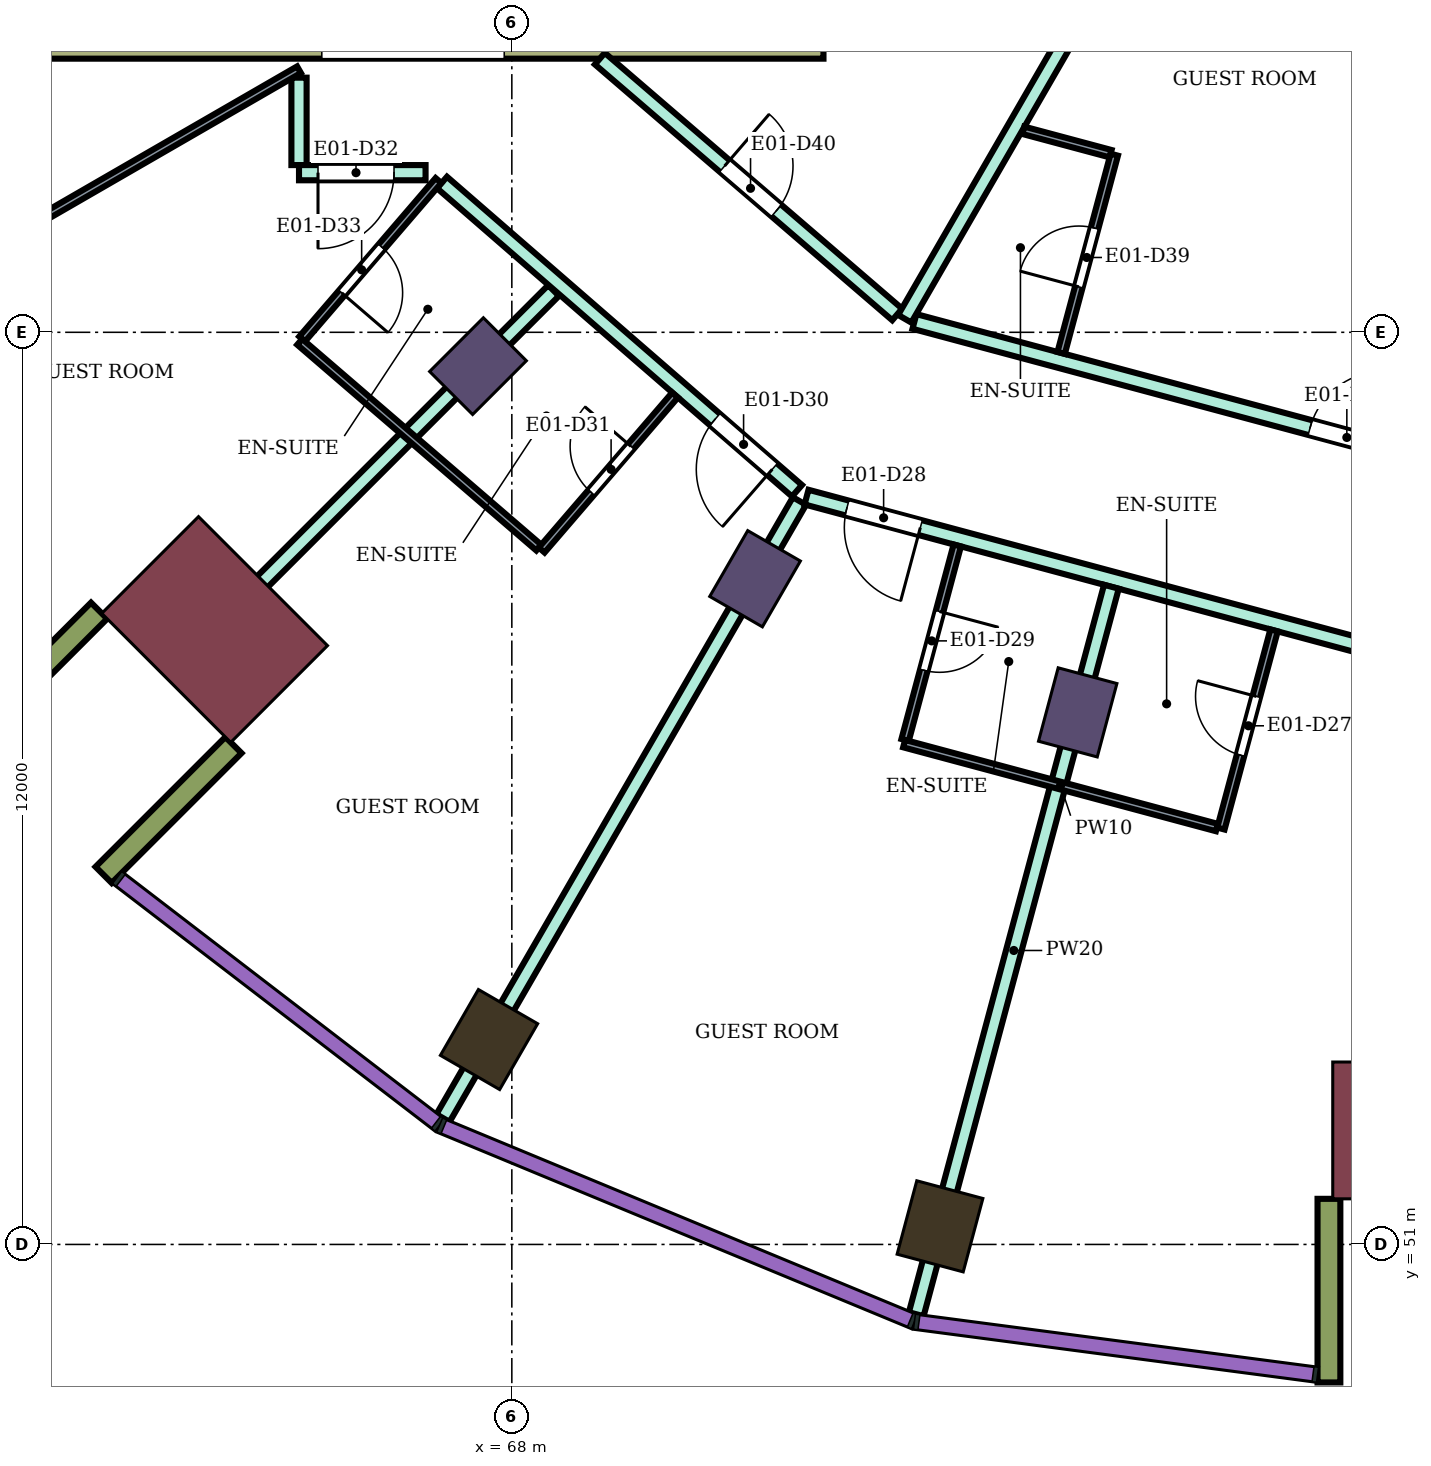
"""IFC4 building model, lengths in metres.
Left out: names, types, materials, properties, quantities, classifications, styles, units other than length and angle.
Written with IfcOpenShell. Run it as: python <this file> out.ifc"""

import sys

from ifc_helpers import new_model, si_unit, direction, frame, frame_2d, origin, origin_2d, place, context, subcontext, project, spatial, rectangle, extrude, element, fill, save


model = new_model("IFC4")
c1 = context("Model", 3, precision=1e-05, world=origin(), true_north=direction((0.0, 1.0)))
c2 = subcontext(c1, "Body", "Model", "MODEL_VIEW")
j1 = project(units=[si_unit("LENGTHUNIT", "METRE"), si_unit("PLANEANGLEUNIT", "RADIAN")], contexts=[c1])
p1 = place(None, origin())
s1 = spatial("IfcSite", under=j1, at=p1, CompositionType="ELEMENT")
p2 = place(p1, origin())
s2 = spatial("IfcBuilding", under=s1, at=p2, CompositionType="ELEMENT")
p3 = place(p2, frame((0.0, 0.0, 122.4)))
s3 = spatial("IfcBuildingStorey", under=s2, at=p3, CompositionType="ELEMENT", Elevation=122.4)
for number, where, z_axis, x_axis in (
    (1, (67.7, 53.696, 0.0), (0.0, 0.0, 1.0), (-0.5, -0.866, 0.0)),
    (2, (73.633, 51.238, 0.0), (0.0, 0.0, 1.0), (-0.259, -0.966, 0.0)),
):
    element("IfcColumn", number, at=place(p3, frame(where, z_axis=z_axis, x_axis=x_axis)), inside=s3, PredefinedType="COLUMN", context=c2, shape_type="SweptSolid", body=[
        extrude(rectangle(XDim=1.0, YDim=0.9, at=origin_2d()), origin(), (0.0, 0.0, 1.0), 3.9),
    ])
for number, where, z_axis, x_axis in (
    (3, (67.555, 62.555, 0.0), (0.0, 0.0, 1.0), (-0.707, -0.707, 0.0)),
    (4, (71.2, 59.758, 0.0), (0.0, 0.0, 1.0), (-0.5, -0.866, 0.0)),
    (5, (75.445, 58.0, 0.0), (0.0, 0.0, 1.0), (-0.259, -0.966, 0.0)),
):
    element("IfcColumn", number, at=place(p3, frame(where, z_axis=z_axis, x_axis=x_axis)), inside=s3, PredefinedType="COLUMN", context=c2, shape_type="SweptSolid", body=[
        extrude(rectangle(XDim=1.0, YDim=0.8, at=origin_2d()), origin(), (0.0, 0.0, 1.0), 3.9),
    ])
for number, where, z_axis, x_axis in (
    (6, (64.09, 59.09, 0.0), (0.0, 0.0, 1.0), (-0.707, -0.707, 0.0)),
    (7, (80.0, 52.5, 0.0), (0.0, 0.0, 1.0), (0.0, -1.0, 0.0)),
):
    element("IfcColumn", number, at=place(p3, frame(where, z_axis=z_axis, x_axis=x_axis)), inside=s3, PredefinedType="COLUMN", context=c2, shape_type="SweptSolid", body=[
        extrude(rectangle(XDim=1.8, YDim=2.4, at=origin_2d()), origin(), (0.0, 0.0, 1.0), 3.9),
    ])
p4 = place(p3, frame((72.1, 66.95, 0.0), z_axis=(0.0, 0.0, 1.0), x_axis=(-1.0, 0.0, 0.0)))
e8 = element("IfcWall", 8, at=p4, inside=s3, PredefinedType="SHEAR", context=c2, shape_type="SweptSolid", body=[
    extrude(rectangle(XDim=14.8, YDim=0.7, at=frame_2d((7.4, 0.0))), origin(), (0.0, 0.0, 1.0), 3.58),
])
p5 = place(p4, frame((4.2, 0.0, 0.0)))
e9 = element("IfcOpeningElement", 9, at=p5, cuts=e8, PredefinedType="OPENING", context=c2, shape_type="SweptSolid", body=[
    extrude(rectangle(XDim=2.4, YDim=2.4, at=frame_2d((1.2, 1.2))), frame((0.0, 0.36, 0.0), z_axis=(0.0, -1.0, 0.0), x_axis=(1.0, 0.0, 0.0)), (0.0, 0.0, 1.0), 0.72),
])
for number, where, z_axis, x_axis in (
    (10, (62.57, 59.338, 0.0), (0.0, 0.0, 1.0), (-0.707, -0.707, 0.0)),
    (11, (64.338, 57.57, 0.0), (0.0, 0.0, 1.0), (-0.707, -0.707, 0.0)),
    (12, (78.75, 51.6, 0.0), (0.0, 0.0, 1.0), (0.0, -1.0, 0.0)),
):
    element("IfcWall", number, at=place(p3, frame(where, z_axis=z_axis, x_axis=x_axis)), inside=s3, PredefinedType="NOTDEFINED", context=c2, shape_type="SweptSolid", body=[
        extrude(rectangle(XDim=2.416, YDim=0.3, at=frame_2d((1.208, 0.0))), origin(), (0.0, 0.0, 1.0), 3.9),
    ])
p6 = place(p3, frame((63.596, 58.596, 0.0), z_axis=(0.0, 0.0, 1.0), x_axis=(0.707106781187, 0.707106781187, 0.0)))
e13 = element("IfcWall", 13, at=p6, inside=s3, PredefinedType="PARTITIONING", context=c2, shape_type="SweptSolid", body=[
    extrude(rectangle(XDim=7.005, YDim=0.2, at=frame_2d((3.503, 0.0))), origin(), (0.0, 0.0, 1.0), 3.45),
])
p7 = place(p3, frame((65.2, 65.2, 0.0), z_axis=(0.0, 0.0, 1.0), x_axis=(0.0, 1.0, 0.0)))
e14 = element("IfcWall", 14, at=p7, inside=s3, PredefinedType="PARTITIONING", context=c2, shape_type="SweptSolid", body=[
    extrude(rectangle(XDim=1.15, YDim=0.2, at=frame_2d((0.575, 0.0))), origin(), (0.0, 0.0, 1.0), 3.45),
])
p8 = place(p3, frame((65.2, 65.1, 0.0), z_axis=(0.0, 0.0, 1.0), x_axis=(1.0, 0.0, 0.0)))
e15 = element("IfcWall", 15, at=p8, inside=s3, PredefinedType="PARTITIONING", context=c2, shape_type="SweptSolid", body=[
    extrude(rectangle(XDim=1.665, YDim=0.2, at=frame_2d((0.833, 0.0))), origin(), (0.0, 0.0, 1.0), 3.45),
])
p9 = place(p8, frame((0.25, 0.0, 0.0)))
e16 = element("IfcOpeningElement", 16, at=p9, cuts=e15, PredefinedType="OPENING", context=c2, shape_type="SweptSolid", body=[
    extrude(rectangle(XDim=1.0, YDim=2.1, at=frame_2d((0.5, 1.05))), frame((0.0, 0.11, 0.0), z_axis=(0.0, -1.0, 0.0), x_axis=(1.0, 0.0, 0.0)), (0.0, 0.0, 1.0), 0.22),
])
p10 = place(p3, frame((67.081, 64.971, 0.0), z_axis=(0.0, 0.0, 1.0), x_axis=(0.755031061605, -0.65568902386, 0.0)))
e17 = element("IfcWall", 17, at=p10, inside=s3, PredefinedType="PARTITIONING", context=c2, shape_type="SweptSolid", body=[
    extrude(rectangle(XDim=6.186, YDim=0.2, at=frame_2d((3.093, 0.0))), origin(), (0.0, 0.0, 1.0), 3.45),
])
p11 = place(p10, frame((4.755, 0.0, 0.0)))
e18 = element("IfcOpeningElement", 18, at=p11, cuts=e17, PredefinedType="OPENING", context=c2, shape_type="SweptSolid", body=[
    extrude(rectangle(XDim=1.0, YDim=2.1, at=frame_2d((0.5, 1.05))), frame((0.0, 0.11, 0.0), z_axis=(0.0, -1.0, 0.0), x_axis=(1.0, 0.0, 0.0)), (0.0, 0.0, 1.0), 0.22),
])
p12 = place(p3, frame((67.094, 52.663, 0.0), z_axis=(0.0, 0.0, 1.0), x_axis=(0.500228134253, 0.865893650342, 0.0)))
e19 = element("IfcWall", 19, at=p12, inside=s3, PredefinedType="PARTITIONING", context=c2, shape_type="SweptSolid", body=[
    extrude(rectangle(XDim=9.375, YDim=0.2, at=frame_2d((4.687, 0.0))), origin(), (0.0, 0.0, 1.0), 3.45),
])
p13 = place(p3, frame((69.158, 66.6, 0.0), z_axis=(0.0, 0.0, 1.0), x_axis=(0.758063092745, -0.652181222835, 0.0)))
e20 = element("IfcWall", 20, at=p13, inside=s3, PredefinedType="PARTITIONING", context=c2, shape_type="SweptSolid", body=[
    extrude(rectangle(XDim=5.16, YDim=0.2, at=frame_2d((2.58, 0.0))), origin(), (0.0, 0.0, 1.0), 3.45),
])
p14 = place(p13, frame((2.165, 0.0, 0.0)))
e21 = element("IfcOpeningElement", 21, at=p14, cuts=e20, PredefinedType="OPENING", context=c2, shape_type="SweptSolid", body=[
    extrude(rectangle(XDim=0.9, YDim=2.1, at=frame_2d((0.45, 1.05))), frame((0.0, 0.11, 0.0), z_axis=(0.0, -1.0, 0.0), x_axis=(1.0, 0.0, 0.0)), (0.0, 0.0, 1.0), 0.22),
])
p15 = place(p3, frame((71.877, 60.832, 0.0), z_axis=(0.0, 0.0, 1.0), x_axis=(0.965857276008, -0.259074742848, 0.0)))
e22 = element("IfcWall", 22, at=p15, inside=s3, PredefinedType="PARTITIONING", context=c2, shape_type="SweptSolid", body=[
    extrude(rectangle(XDim=8.36, YDim=0.2, at=frame_2d((4.18, 0.0))), origin(), (0.0, 0.0, 1.0), 3.45),
])
p16 = place(p15, frame((0.55, 0.0, 0.0)))
e23 = element("IfcOpeningElement", 23, at=p16, cuts=e22, PredefinedType="OPENING", context=c2, shape_type="SweptSolid", body=[
    extrude(rectangle(XDim=1.0, YDim=2.1, at=frame_2d((0.5, 1.05))), frame((0.0, 0.11, 0.0), z_axis=(0.0, -1.0, 0.0), x_axis=(1.0, 0.0, 0.0)), (0.0, 0.0, 1.0), 0.22),
])
p17 = place(p3, frame((73.297, 63.143, 0.0), z_axis=(0.0, 0.0, 1.0), x_axis=(0.965859030528, -0.25906820173, 0.0)))
e24 = element("IfcWall", 24, at=p17, inside=s3, PredefinedType="PARTITIONING", context=c2, shape_type="SweptSolid", body=[
    extrude(rectangle(XDim=6.81, YDim=0.2, at=frame_2d((3.405, 0.0))), origin(), (0.0, 0.0, 1.0), 3.45),
])
p18 = place(p17, frame((5.39, 0.0, 0.0)))
e25 = element("IfcOpeningElement", 25, at=p18, cuts=e24, PredefinedType="OPENING", context=c2, shape_type="SweptSolid", body=[
    extrude(rectangle(XDim=1.0, YDim=2.1, at=frame_2d((0.5, 1.05))), frame((0.0, 0.11, 0.0), z_axis=(0.0, -1.0, 0.0), x_axis=(1.0, 0.0, 0.0)), (0.0, 0.0, 1.0), 0.22),
])
p19 = place(p3, frame((73.169, 63.178, 0.0), z_axis=(0.0, 0.0, 1.0), x_axis=(0.500239348149, 0.865887171959, 0.0)))
e26 = element("IfcWall", 26, at=p19, inside=s3, PredefinedType="PARTITIONING", context=c2, shape_type="SweptSolid", body=[
    extrude(rectangle(XDim=5.955, YDim=0.2, at=frame_2d((2.978, 0.0))), origin(), (0.0, 0.0, 1.0), 3.45),
])
p20 = place(p3, frame((73.321, 50.082, 0.0), z_axis=(0.0, 0.0, 1.0), x_axis=(0.259057928998, 0.96586178588, 0.0)))
e27 = element("IfcWall", 27, at=p20, inside=s3, PredefinedType="PARTITIONING", context=c2, shape_type="SweptSolid", body=[
    extrude(rectangle(XDim=9.909, YDim=0.2, at=frame_2d((4.954, 0.0))), origin(), (0.0, 0.0, 1.0), 3.45),
])
p21 = place(p3, frame((57.659, 62.101, 0.0), z_axis=(0.0, 0.0, 1.0), x_axis=(0.86602264145, 0.500004784474, 0.0)))
e28 = element("IfcWall", 28, at=p21, inside=s3, PredefinedType="PARTITIONING", context=c2, shape_type="SweptSolid", body=[
    extrude(rectangle(XDim=8.708, YDim=0.1, at=frame_2d((4.354, 0.0))), origin(), (0.0, 0.0, 1.0), 3.45),
])
p22 = place(p21, frame((3.929, 0.0, 0.0)))
e29 = element("IfcOpeningElement", 29, at=p22, cuts=e28, PredefinedType="OPENING", context=c2, shape_type="SweptSolid", body=[
    extrude(rectangle(XDim=0.9, YDim=2.1, at=frame_2d((0.45, 1.05))), frame((0.0, 0.06, 0.0), z_axis=(0.0, -1.0, 0.0), x_axis=(1.0, 0.0, 0.0)), (0.0, 0.0, 1.0), 0.12),
])
p23 = place(p3, frame((65.242, 62.912, 0.0), z_axis=(0.0, 0.0, 1.0), x_axis=(0.652069888227, 0.758158862553, 0.0)))
e30 = element("IfcWall", 30, at=p23, inside=s3, PredefinedType="PARTITIONING", context=c2, shape_type="SweptSolid", body=[
    extrude(rectangle(XDim=2.75, YDim=0.1, at=frame_2d((1.375, 0.0))), origin(), (0.0, 0.0, 1.0), 3.45),
])
p24 = place(p23, frame((0.8, 0.0, 0.0)))
e31 = element("IfcOpeningElement", 31, at=p24, cuts=e30, PredefinedType="OPENING", context=c2, shape_type="SweptSolid", body=[
    extrude(rectangle(XDim=0.8, YDim=2.1, at=frame_2d((0.4, 1.05))), frame((0.0, 0.06, 0.0), z_axis=(0.0, -1.0, 0.0), x_axis=(1.0, 0.0, 0.0)), (0.0, 0.0, 1.0), 0.12),
])
p25 = place(p3, frame((65.209, 62.875, 0.0), z_axis=(0.0, 0.0, 1.0), x_axis=(0.757930378138, -0.652335451969, 0.0)))
e32 = element("IfcWall", 32, at=p25, inside=s3, PredefinedType="PARTITIONING", context=c2, shape_type="SweptSolid", body=[
    extrude(rectangle(XDim=4.15, YDim=0.1, at=frame_2d((2.075, 0.0))), origin(), (0.0, 0.0, 1.0), 3.45),
])
p26 = place(p3, frame((68.393, 60.135, 0.0), z_axis=(0.0, 0.0, 1.0), x_axis=(0.652061182569, 0.758166349944, 0.0)))
e33 = element("IfcWall", 33, at=p26, inside=s3, PredefinedType="PARTITIONING", context=c2, shape_type="SweptSolid", body=[
    extrude(rectangle(XDim=2.69, YDim=0.1, at=frame_2d((1.345, 0.0))), origin(), (0.0, 0.0, 1.0), 3.45),
])
p27 = place(p26, frame((1.0, 0.0, 0.0)))
e34 = element("IfcOpeningElement", 34, at=p27, cuts=e33, PredefinedType="OPENING", context=c2, shape_type="SweptSolid", body=[
    extrude(rectangle(XDim=0.8, YDim=2.1, at=frame_2d((0.4, 1.05))), frame((0.0, 0.06, 0.0), z_axis=(0.0, -1.0, 0.0), x_axis=(1.0, 0.0, 0.0)), (0.0, 0.0, 1.0), 0.12),
])
p28 = place(p3, frame((73.174, 57.636, 0.0), z_axis=(0.0, 0.0, 1.0), x_axis=(0.258952498977, 0.96589005755, 0.0)))
e35 = element("IfcWall", 35, at=p28, inside=s3, PredefinedType="PARTITIONING", context=c2, shape_type="SweptSolid", body=[
    extrude(rectangle(XDim=2.65, YDim=0.1, at=frame_2d((1.325, 0.0))), origin(), (0.0, 0.0, 1.0), 3.45),
])
p29 = place(p28, frame((0.95, 0.0, 0.0)))
e36 = element("IfcOpeningElement", 36, at=p29, cuts=e35, PredefinedType="OPENING", context=c2, shape_type="SweptSolid", body=[
    extrude(rectangle(XDim=0.8, YDim=2.1, at=frame_2d((0.4, 1.05))), frame((0.0, 0.06, 0.0), z_axis=(0.0, -1.0, 0.0), x_axis=(1.0, 0.0, 0.0)), (0.0, 0.0, 1.0), 0.12),
])
p30 = place(p3, frame((73.161, 57.588, 0.0), z_axis=(0.0, 0.0, 1.0), x_axis=(0.965858226827, -0.259071198071, 0.0)))
e37 = element("IfcWall", 37, at=p30, inside=s3, PredefinedType="PARTITIONING", context=c2, shape_type="SweptSolid", body=[
    extrude(rectangle(XDim=4.26, YDim=0.1, at=frame_2d((2.13, 0.0))), origin(), (0.0, 0.0, 1.0), 3.45),
])
p31 = place(p3, frame((74.729, 65.657, 0.0), z_axis=(0.0, 0.0, 1.0), x_axis=(0.965948051503, -0.258736085224, 0.0)))
e38 = element("IfcWall", 38, at=p31, inside=s3, PredefinedType="PARTITIONING", context=c2, shape_type="SweptSolid", body=[
    extrude(rectangle(XDim=1.189, YDim=0.1, at=frame_2d((0.594, 0.0))), origin(), (0.0, 0.0, 1.0), 3.45),
])
p32 = place(p3, frame((75.227, 62.729, 0.0), z_axis=(0.0, 0.0, 1.0), x_axis=(0.258945475746, 0.965891940432, 0.0)))
e39 = element("IfcWall", 39, at=p32, inside=s3, PredefinedType="PARTITIONING", context=c2, shape_type="SweptSolid", body=[
    extrude(rectangle(XDim=2.7, YDim=0.1, at=frame_2d((1.35, 0.0))), origin(), (0.0, 0.0, 1.0), 3.45),
])
p33 = place(p32, frame((0.9, 0.0, 0.0)))
e40 = element("IfcOpeningElement", 40, at=p33, cuts=e39, PredefinedType="OPENING", context=c2, shape_type="SweptSolid", body=[
    extrude(rectangle(XDim=0.8, YDim=2.1, at=frame_2d((0.4, 1.05))), frame((0.0, 0.06, 0.0), z_axis=(0.0, -1.0, 0.0), x_axis=(1.0, 0.0, 0.0)), (0.0, 0.0, 1.0), 0.12),
])
p34 = place(p3, frame((77.329, 56.471, 0.0), z_axis=(0.0, 0.0, 1.0), x_axis=(0.259013334072, 0.965873745773, 0.0)))
e41 = element("IfcWall", 41, at=p34, inside=s3, PredefinedType="PARTITIONING", context=c2, shape_type="SweptSolid", body=[
    extrude(rectangle(XDim=2.699, YDim=0.1, at=frame_2d((1.35, 0.0))), origin(), (0.0, 0.0, 1.0), 3.45),
])
p35 = place(p34, frame((1.0, 0.0, 0.0)))
e42 = element("IfcOpeningElement", 42, at=p35, cuts=e41, PredefinedType="OPENING", context=c2, shape_type="SweptSolid", body=[
    extrude(rectangle(XDim=0.8, YDim=2.1, at=frame_2d((0.4, 1.05))), frame((0.0, 0.06, 0.0), z_axis=(0.0, -1.0, 0.0), x_axis=(1.0, 0.0, 0.0)), (0.0, 0.0, 1.0), 0.12),
])
p36 = place(p35, origin())
e43 = element("IfcDoor", 43, at=p36, inside=s3, OperationType="SINGLE_SWING_RIGHT", PredefinedType="DOOR", context=c2, shape_type="SweptSolid", body=[
    extrude(rectangle(XDim=0.8, YDim=2.1, at=frame_2d((0.4, 1.05))), frame((0.0, 0.025, 0.0), z_axis=(0.0, -1.0, 0.0), x_axis=(1.0, 0.0, 0.0)), (0.0, 0.0, 1.0), 0.05),
])
fill(e42, e43)
p37 = place(p16, frame((1.0, 0.0, 0.0), z_axis=(0.0, 0.0, 1.0), x_axis=(-1.0, 0.0, 0.0)))
e44 = element("IfcDoor", 44, at=p37, inside=s3, OperationType="SINGLE_SWING_LEFT", PredefinedType="DOOR", context=c2, shape_type="SweptSolid", body=[
    extrude(rectangle(XDim=1.0, YDim=2.1, at=frame_2d((0.5, 1.05))), frame((0.0, 0.025, 0.0), z_axis=(0.0, -1.0, 0.0), x_axis=(1.0, 0.0, 0.0)), (0.0, 0.0, 1.0), 0.05),
])
fill(e23, e44)
p38 = place(p29, frame((0.8, 0.0, 0.0), z_axis=(0.0, 0.0, 1.0), x_axis=(-1.0, 0.0, 0.0)))
e45 = element("IfcDoor", 45, at=p38, inside=s3, OperationType="SINGLE_SWING_LEFT", PredefinedType="DOOR", context=c2, shape_type="SweptSolid", body=[
    extrude(rectangle(XDim=0.8, YDim=2.1, at=frame_2d((0.4, 1.05))), frame((0.0, 0.025, 0.0), z_axis=(0.0, -1.0, 0.0), x_axis=(1.0, 0.0, 0.0)), (0.0, 0.0, 1.0), 0.05),
])
fill(e36, e45)
p39 = place(p11, frame((1.0, 0.0, 0.0), z_axis=(0.0, 0.0, 1.0), x_axis=(-1.0, 0.0, 0.0)))
e46 = element("IfcDoor", 46, at=p39, inside=s3, OperationType="SINGLE_SWING_LEFT", PredefinedType="DOOR", context=c2, shape_type="SweptSolid", body=[
    extrude(rectangle(XDim=1.0, YDim=2.1, at=frame_2d((0.5, 1.05))), frame((0.0, 0.025, 0.0), z_axis=(0.0, -1.0, 0.0), x_axis=(1.0, 0.0, 0.0)), (0.0, 0.0, 1.0), 0.05),
])
fill(e18, e46)
p40 = place(p27, origin())
e47 = element("IfcDoor", 47, at=p40, inside=s3, OperationType="SINGLE_SWING_RIGHT", PredefinedType="DOOR", context=c2, shape_type="SweptSolid", body=[
    extrude(rectangle(XDim=0.8, YDim=2.1, at=frame_2d((0.4, 1.05))), frame((0.0, 0.025, 0.0), z_axis=(0.0, -1.0, 0.0), x_axis=(1.0, 0.0, 0.0)), (0.0, 0.0, 1.0), 0.05),
])
fill(e34, e47)
p41 = place(p9, frame((1.0, 0.0, 0.0), z_axis=(0.0, 0.0, 1.0), x_axis=(-1.0, 0.0, 0.0)))
e48 = element("IfcDoor", 48, at=p41, inside=s3, OperationType="SINGLE_SWING_RIGHT", PredefinedType="DOOR", context=c2, shape_type="SweptSolid", body=[
    extrude(rectangle(XDim=1.0, YDim=2.1, at=frame_2d((0.5, 1.05))), frame((0.0, 0.025, 0.0), z_axis=(0.0, -1.0, 0.0), x_axis=(1.0, 0.0, 0.0)), (0.0, 0.0, 1.0), 0.05),
])
fill(e16, e48)
p42 = place(p24, frame((0.8, 0.0, 0.0), z_axis=(0.0, 0.0, 1.0), x_axis=(-1.0, 0.0, 0.0)))
e49 = element("IfcDoor", 49, at=p42, inside=s3, OperationType="SINGLE_SWING_RIGHT", PredefinedType="DOOR", context=c2, shape_type="SweptSolid", body=[
    extrude(rectangle(XDim=0.8, YDim=2.1, at=frame_2d((0.4, 1.05))), frame((0.0, 0.025, 0.0), z_axis=(0.0, -1.0, 0.0), x_axis=(1.0, 0.0, 0.0)), (0.0, 0.0, 1.0), 0.05),
])
fill(e31, e49)
p43 = place(p18, origin())
e50 = element("IfcDoor", 50, at=p43, inside=s3, OperationType="SINGLE_SWING_RIGHT", PredefinedType="DOOR", context=c2, shape_type="SweptSolid", body=[
    extrude(rectangle(XDim=1.0, YDim=2.1, at=frame_2d((0.5, 1.05))), frame((0.0, 0.025, 0.0), z_axis=(0.0, -1.0, 0.0), x_axis=(1.0, 0.0, 0.0)), (0.0, 0.0, 1.0), 0.05),
])
fill(e25, e50)
p44 = place(p33, origin())
e51 = element("IfcDoor", 51, at=p44, inside=s3, OperationType="SINGLE_SWING_LEFT", PredefinedType="DOOR", context=c2, shape_type="SweptSolid", body=[
    extrude(rectangle(XDim=0.8, YDim=2.1, at=frame_2d((0.4, 1.05))), frame((0.0, 0.025, 0.0), z_axis=(0.0, -1.0, 0.0), x_axis=(1.0, 0.0, 0.0)), (0.0, 0.0, 1.0), 0.05),
])
fill(e40, e51)
p45 = place(p14, origin())
e52 = element("IfcDoor", 52, at=p45, inside=s3, OperationType="SINGLE_SWING_LEFT", PredefinedType="DOOR", context=c2, shape_type="SweptSolid", body=[
    extrude(rectangle(XDim=0.9, YDim=2.1, at=frame_2d((0.45, 1.05))), frame((0.0, 0.025, 0.0), z_axis=(0.0, -1.0, 0.0), x_axis=(1.0, 0.0, 0.0)), (0.0, 0.0, 1.0), 0.05),
])
fill(e21, e52)
save(model, sys.argv[1])
